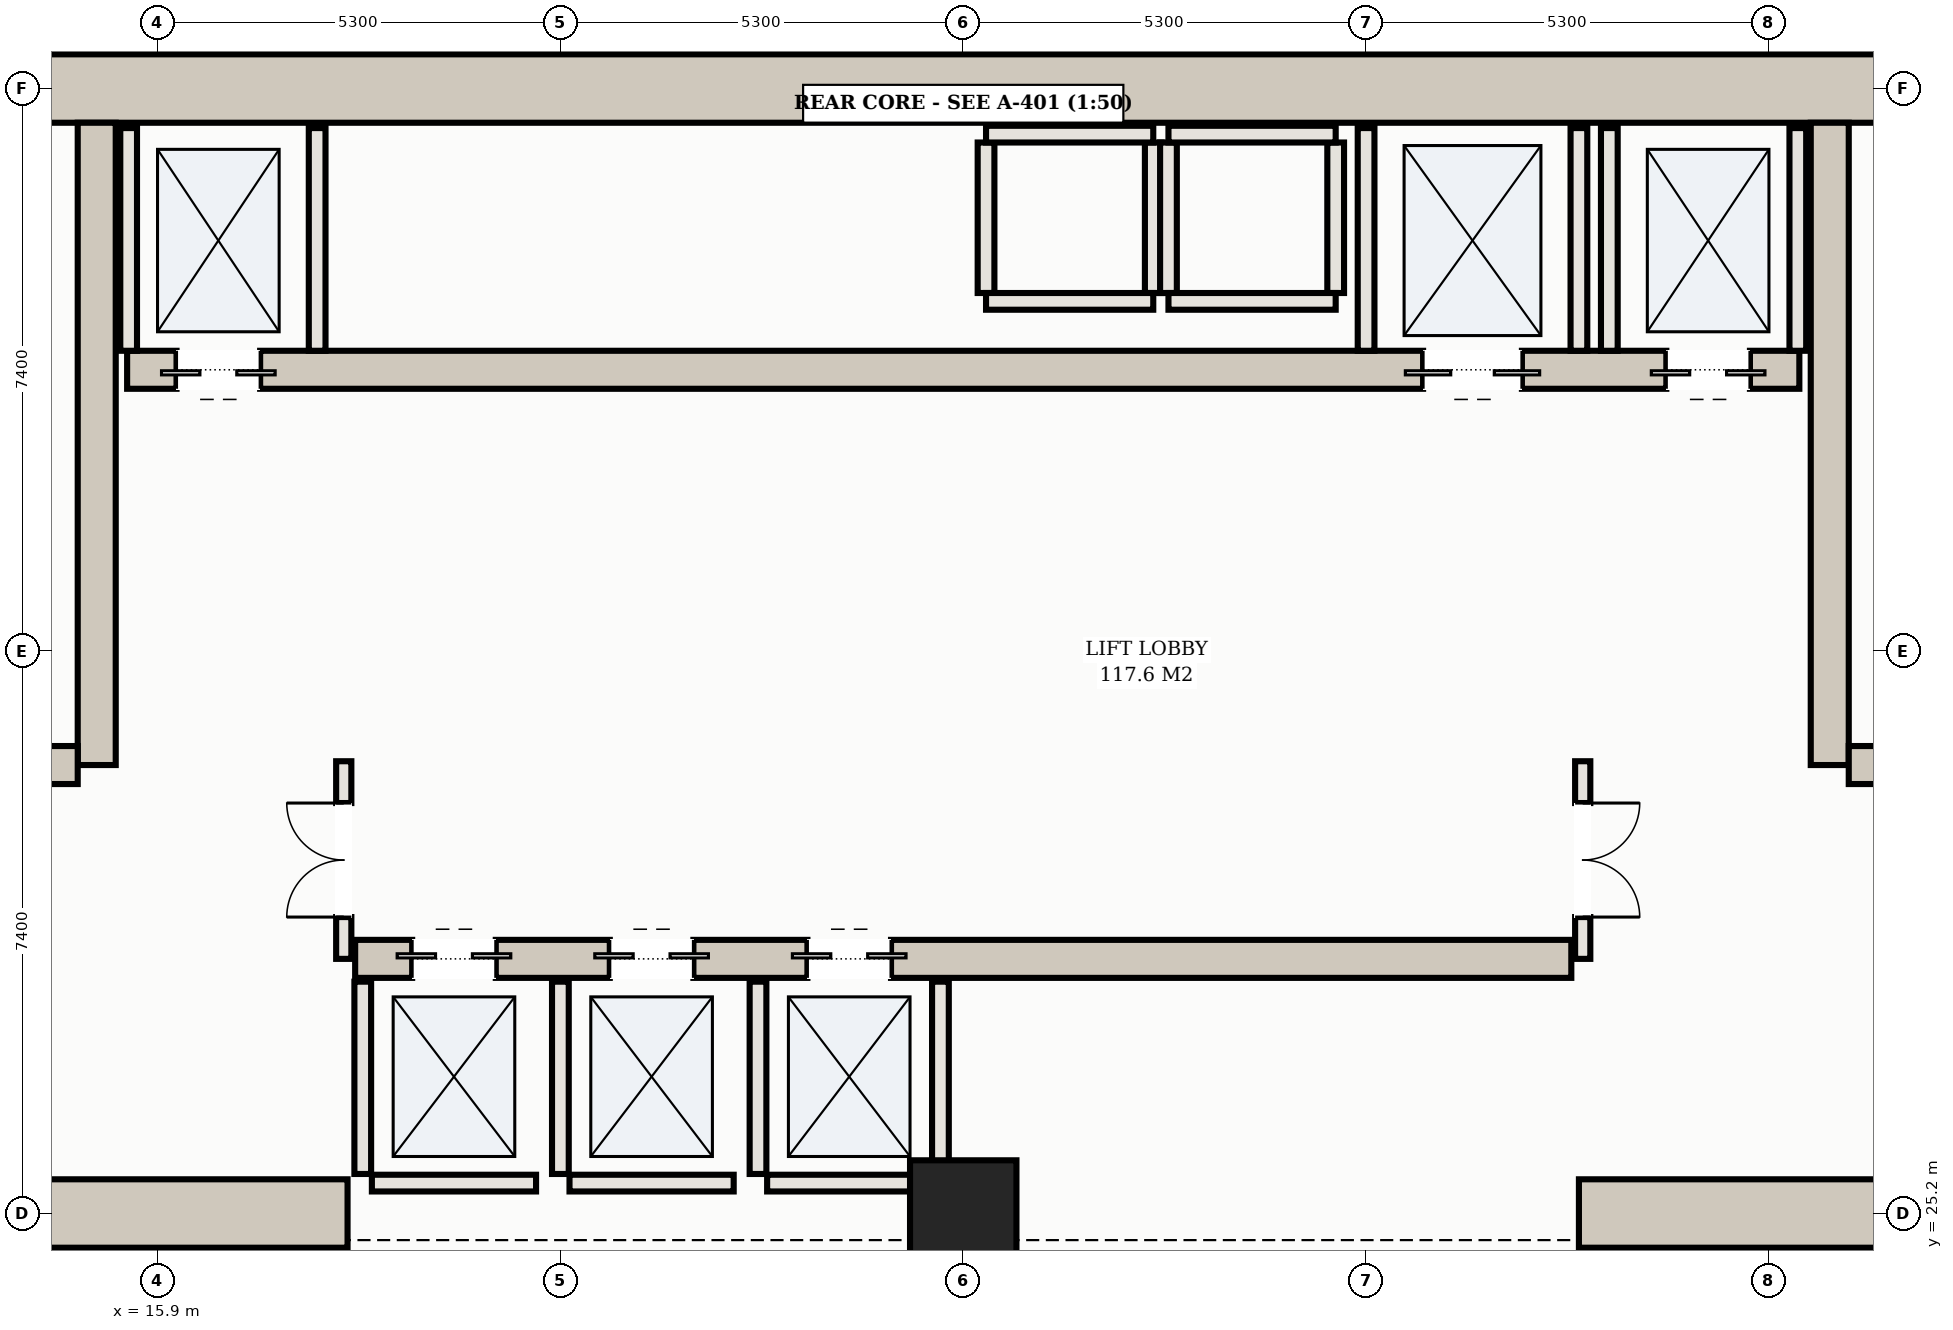
"""IFC4 building model, lengths in metres.
Left out: names, types, materials, properties, quantities, classifications, styles, units other than length and angle.
Written with IfcOpenShell. Run it as: python <this file> out.ifc"""

import sys

from ifc_helpers import new_model, si_unit, direction, frame, frame_2d, origin, origin_2d, place, context, subcontext, project, spatial, rectangle, hollow_rectangle, extrude, element, fill, save


model = new_model("IFC4")
c1 = context("Model", 3, precision=1e-05, world=origin(), true_north=direction((0.0, 1.0)))
c2 = subcontext(c1, "Body", "Model", "MODEL_VIEW")
j1 = project(units=[si_unit("LENGTHUNIT", "METRE"), si_unit("PLANEANGLEUNIT", "RADIAN")], contexts=[c1])
p1 = place(None, origin())
s1 = spatial("IfcSite", under=j1, at=p1, CompositionType="ELEMENT")
p2 = place(p1, origin())
s2 = spatial("IfcBuilding", under=s1, at=p2, CompositionType="ELEMENT")
p3 = place(p2, frame((0.0, 0.0, -8.4)))
s3 = spatial("IfcBuildingStorey", under=s2, at=p3, CompositionType="ELEMENT", Elevation=-8.4)
p4 = place(p3, frame((10.15, 40.0, 0.0), z_axis=(0.0, 0.0, 1.0), x_axis=(1.0, 0.0, 0.0)))
e1 = element("IfcWall", 1, at=p4, inside=s3, PredefinedType="SHEAR", context=c2, shape_type="SweptSolid", body=[
    extrude(rectangle(XDim=32.7, YDim=0.9, at=frame_2d((16.35, 0.0))), origin(), (0.0, 0.0, 1.0), 3.92),
])
for number, where, z_axis, x_axis in (
    (2, (10.15, 25.2, 0.0), (0.0, 0.0, 1.0), (1.0, 0.0, 0.0)),
    (3, (34.6, 25.2, 0.0), (0.0, 0.0, 1.0), (1.0, 0.0, 0.0)),
):
    element("IfcWall", number, at=place(p3, frame(where, z_axis=z_axis, x_axis=x_axis)), inside=s3, PredefinedType="SHEAR", context=c2, shape_type="SweptSolid", body=[
        extrude(rectangle(XDim=8.25, YDim=0.9, at=frame_2d((4.125, 0.0))), origin(), (0.0, 0.0, 1.0), 3.92),
    ])
p5 = place(p3, frame((15.1, 31.1, 0.0), z_axis=(0.0, 0.0, 1.0), x_axis=(0.0, 1.0, 0.0)))
e4 = element("IfcWall", 4, at=p5, inside=s3, PredefinedType="SHEAR", context=c2, shape_type="SweptSolid", body=[
    extrude(rectangle(XDim=8.45, YDim=0.5, at=frame_2d((4.225, 0.0))), origin(), (0.0, 0.0, 1.0), 3.92),
])
p6 = place(p3, frame((11.05, 31.1, 0.0), z_axis=(0.0, 0.0, 1.0), x_axis=(1.0, 0.0, 0.0)))
e5 = element("IfcWall", 5, at=p6, inside=s3, PredefinedType="SHEAR", context=c2, shape_type="SweptSolid", body=[
    extrude(rectangle(XDim=3.8, YDim=0.5, at=frame_2d((1.9, 0.0))), origin(), (0.0, 0.0, 1.0), 3.92),
])
p7 = place(p3, frame((37.9, 31.1, 0.0), z_axis=(0.0, 0.0, 1.0), x_axis=(0.0, 1.0, 0.0)))
e6 = element("IfcWall", 6, at=p7, inside=s3, PredefinedType="SHEAR", context=c2, shape_type="SweptSolid", body=[
    extrude(rectangle(XDim=8.45, YDim=0.5, at=frame_2d((4.225, 0.0))), origin(), (0.0, 0.0, 1.0), 3.92),
])
p8 = place(p3, frame((38.15, 31.1, 0.0), z_axis=(0.0, 0.0, 1.0), x_axis=(1.0, 0.0, 0.0)))
e7 = element("IfcWall", 7, at=p8, inside=s3, PredefinedType="SHEAR", context=c2, shape_type="SweptSolid", body=[
    extrude(rectangle(XDim=3.8, YDim=0.5, at=frame_2d((1.9, 0.0))), origin(), (0.0, 0.0, 1.0), 3.92),
])
p9 = place(p3, frame((15.5, 36.3, 0.0), z_axis=(0.0, 0.0, 1.0), x_axis=(1.0, 0.0, 0.0)))
e8 = element("IfcWall", 8, at=p9, inside=s3, PredefinedType="SHEAR", context=c2, shape_type="SweptSolid", body=[
    extrude(rectangle(XDim=22.0, YDim=0.5, at=frame_2d((11.0, 0.0))), origin(), (0.0, 0.0, 1.0), 3.92),
])
p10 = place(p9, frame((0.65, 0.0, 0.0)))
e9 = element("IfcOpeningElement", 9, at=p10, cuts=e8, PredefinedType="OPENING", context=c2, shape_type="SweptSolid", body=[
    extrude(rectangle(XDim=1.1, YDim=2.15, at=frame_2d((0.55, 1.075))), frame((0.0, 0.26, 0.0), z_axis=(0.0, -1.0, 0.0), x_axis=(1.0, 0.0, 0.0)), (0.0, 0.0, 1.0), 0.52),
])
p11 = place(p9, frame((20.25, 0.0, 0.0)))
e10 = element("IfcOpeningElement", 10, at=p11, cuts=e8, PredefinedType="OPENING", context=c2, shape_type="SweptSolid", body=[
    extrude(rectangle(XDim=1.1, YDim=2.15, at=frame_2d((0.55, 1.075))), frame((0.0, 0.26, 0.0), z_axis=(0.0, -1.0, 0.0), x_axis=(1.0, 0.0, 0.0)), (0.0, 0.0, 1.0), 0.52),
])
p12 = place(p9, frame((17.05, 0.0, 0.0)))
e11 = element("IfcOpeningElement", 11, at=p12, cuts=e8, PredefinedType="OPENING", context=c2, shape_type="SweptSolid", body=[
    extrude(rectangle(XDim=1.3, YDim=2.2, at=frame_2d((0.65, 1.1))), frame((0.0, 0.26, 0.0), z_axis=(0.0, -1.0, 0.0), x_axis=(1.0, 0.0, 0.0)), (0.0, 0.0, 1.0), 0.52),
])
p13 = place(p3, frame((18.5, 28.55, 0.0), z_axis=(0.0, 0.0, 1.0), x_axis=(1.0, 0.0, 0.0)))
e12 = element("IfcWall", 12, at=p13, inside=s3, PredefinedType="SHEAR", context=c2, shape_type="SweptSolid", body=[
    extrude(rectangle(XDim=16.0, YDim=0.5, at=frame_2d((8.0, 0.0))), origin(), (0.0, 0.0, 1.0), 3.92),
])
p14 = place(p13, frame((0.75, 0.0, 0.0)))
e13 = element("IfcOpeningElement", 13, at=p14, cuts=e12, PredefinedType="OPENING", context=c2, shape_type="SweptSolid", body=[
    extrude(rectangle(XDim=1.1, YDim=2.15, at=frame_2d((0.55, 1.075))), frame((0.0, 0.26, 0.0), z_axis=(0.0, -1.0, 0.0), x_axis=(1.0, 0.0, 0.0)), (0.0, 0.0, 1.0), 0.52),
])
p15 = place(p13, frame((3.35, 0.0, 0.0)))
e14 = element("IfcOpeningElement", 14, at=p15, cuts=e12, PredefinedType="OPENING", context=c2, shape_type="SweptSolid", body=[
    extrude(rectangle(XDim=1.1, YDim=2.15, at=frame_2d((0.55, 1.075))), frame((0.0, 0.26, 0.0), z_axis=(0.0, -1.0, 0.0), x_axis=(1.0, 0.0, 0.0)), (0.0, 0.0, 1.0), 0.52),
])
p16 = place(p13, frame((5.95, 0.0, 0.0)))
e15 = element("IfcOpeningElement", 15, at=p16, cuts=e12, PredefinedType="OPENING", context=c2, shape_type="SweptSolid", body=[
    extrude(rectangle(XDim=1.1, YDim=2.15, at=frame_2d((0.55, 1.075))), frame((0.0, 0.26, 0.0), z_axis=(0.0, -1.0, 0.0), x_axis=(1.0, 0.0, 0.0)), (0.0, 0.0, 1.0), 0.52),
])
p17 = place(p3, frame((26.5, 25.2, 0.0), z_axis=(0.0, 0.0, 1.0), x_axis=(1.0, 0.0, 0.0)))
e16 = element("IfcColumn", 16, at=p17, inside=s3, PredefinedType="COLUMN", context=c2, shape_type="SweptSolid", body=[
    extrude(hollow_rectangle(XDim=1.4, YDim=1.4, WallThickness=0.045, at=origin_2d()), origin(), (0.0, 0.0, 1.0), 4.2),
])
for number, where, z_axis, x_axis in (
    (17, (15.52, 36.55, 0.0), (0.0, 0.0, 1.0), (0.0, 1.0, 0.0)),
    (18, (18.0, 36.55, 0.0), (0.0, 0.0, 1.0), (0.0, 1.0, 0.0)),
    (19, (35.0, 36.55, 0.0), (0.0, 0.0, 1.0), (0.0, 1.0, 0.0)),
    (20, (37.48, 36.55, 0.0), (0.0, 0.0, 1.0), (0.0, 1.0, 0.0)),
    (21, (31.8, 36.55, 0.0), (0.0, 0.0, 1.0), (0.0, 1.0, 0.0)),
    (22, (34.6, 36.55, 0.0), (0.0, 0.0, 1.0), (0.0, 1.0, 0.0)),
):
    element("IfcWall", number, at=place(p3, frame(where, z_axis=z_axis, x_axis=x_axis)), inside=s3, PredefinedType="SOLIDWALL", context=c2, shape_type="SweptSolid", body=[
        extrude(rectangle(XDim=2.93, YDim=0.22, at=frame_2d((1.465, 0.0))), origin(), (0.0, 0.0, 1.0), 3.92),
    ])
p18 = place(p3, frame((18.6, 25.72, 0.0), z_axis=(0.0, 0.0, 1.0), x_axis=(0.0, 1.0, 0.0)))
e23 = element("IfcWall", 23, at=p18, inside=s3, PredefinedType="SOLIDWALL", context=c2, shape_type="SweptSolid", body=[
    extrude(rectangle(XDim=2.53, YDim=0.22, at=frame_2d((1.265, 0.0))), origin(), (0.0, 0.0, 1.0), 3.92),
])
p19 = place(p3, frame((18.72, 25.6, 0.0), z_axis=(0.0, 0.0, 1.0), x_axis=(1.0, 0.0, 0.0)))
e24 = element("IfcWall", 24, at=p19, inside=s3, PredefinedType="SOLIDWALL", context=c2, shape_type="SweptSolid", body=[
    extrude(rectangle(XDim=2.16, YDim=0.22, at=frame_2d((1.08, 0.0))), origin(), (0.0, 0.0, 1.0), 2.965),
])
p20 = place(p3, frame((21.2, 25.72, 0.0), z_axis=(0.0, 0.0, 1.0), x_axis=(0.0, 1.0, 0.0)))
e25 = element("IfcWall", 25, at=p20, inside=s3, PredefinedType="SOLIDWALL", context=c2, shape_type="SweptSolid", body=[
    extrude(rectangle(XDim=2.53, YDim=0.22, at=frame_2d((1.265, 0.0))), origin(), (0.0, 0.0, 1.0), 3.92),
])
p21 = place(p3, frame((21.32, 25.6, 0.0), z_axis=(0.0, 0.0, 1.0), x_axis=(1.0, 0.0, 0.0)))
e26 = element("IfcWall", 26, at=p21, inside=s3, PredefinedType="SOLIDWALL", context=c2, shape_type="SweptSolid", body=[
    extrude(rectangle(XDim=2.16, YDim=0.22, at=frame_2d((1.08, 0.0))), origin(), (0.0, 0.0, 1.0), 2.965),
])
for number, where, z_axis, x_axis in (
    (27, (23.8, 25.72, 0.0), (0.0, 0.0, 1.0), (0.0, 1.0, 0.0)),
    (28, (26.2, 25.72, 0.0), (0.0, 0.0, 1.0), (0.0, 1.0, 0.0)),
):
    element("IfcWall", number, at=place(p3, frame(where, z_axis=z_axis, x_axis=x_axis)), inside=s3, PredefinedType="SOLIDWALL", context=c2, shape_type="SweptSolid", body=[
        extrude(rectangle(XDim=2.53, YDim=0.22, at=frame_2d((1.265, 0.0))), origin(), (0.0, 0.0, 1.0), 3.92),
    ])
p22 = place(p3, frame((23.92, 25.6, 0.0), z_axis=(0.0, 0.0, 1.0), x_axis=(1.0, 0.0, 0.0)))
e29 = element("IfcWall", 29, at=p22, inside=s3, PredefinedType="SOLIDWALL", context=c2, shape_type="SweptSolid", body=[
    extrude(rectangle(XDim=2.16, YDim=0.22, at=frame_2d((1.08, 0.0))), origin(), (0.0, 0.0, 1.0), 2.965),
])
for number, where, z_axis, x_axis in (
    (30, (26.8, 37.31, 0.0), (0.0, 0.0, 1.0), (0.0, 1.0, 0.0)),
    (31, (29.0, 37.31, 0.0), (0.0, 0.0, 1.0), (0.0, 1.0, 0.0)),
):
    element("IfcWall", number, at=place(p3, frame(where, z_axis=z_axis, x_axis=x_axis)), inside=s3, PredefinedType="SOLIDWALL", context=c2, shape_type="SweptSolid", body=[
        extrude(rectangle(XDim=1.98, YDim=0.22, at=frame_2d((0.99, 0.0))), origin(), (0.0, 0.0, 1.0), 3.92),
    ])
for number, where, z_axis, x_axis in (
    (32, (26.8, 39.4, 0.0), (0.0, 0.0, 1.0), (1.0, 0.0, 0.0)),
    (33, (26.8, 37.2, 0.0), (0.0, 0.0, 1.0), (1.0, 0.0, 0.0)),
):
    element("IfcWall", number, at=place(p3, frame(where, z_axis=z_axis, x_axis=x_axis)), inside=s3, PredefinedType="SOLIDWALL", context=c2, shape_type="SweptSolid", body=[
        extrude(rectangle(XDim=2.2, YDim=0.22, at=frame_2d((1.1, 0.0))), origin(), (0.0, 0.0, 1.0), 3.92),
    ])
for number, where, z_axis, x_axis in (
    (34, (29.2, 37.31, 0.0), (0.0, 0.0, 1.0), (0.0, 1.0, 0.0)),
    (35, (31.4, 37.31, 0.0), (0.0, 0.0, 1.0), (0.0, 1.0, 0.0)),
):
    element("IfcWall", number, at=place(p3, frame(where, z_axis=z_axis, x_axis=x_axis)), inside=s3, PredefinedType="SOLIDWALL", context=c2, shape_type="SweptSolid", body=[
        extrude(rectangle(XDim=1.98, YDim=0.22, at=frame_2d((0.99, 0.0))), origin(), (0.0, 0.0, 1.0), 3.92),
    ])
for number, where, z_axis, x_axis in (
    (36, (29.2, 39.4, 0.0), (0.0, 0.0, 1.0), (1.0, 0.0, 0.0)),
    (37, (29.2, 37.2, 0.0), (0.0, 0.0, 1.0), (1.0, 0.0, 0.0)),
):
    element("IfcWall", number, at=place(p3, frame(where, z_axis=z_axis, x_axis=x_axis)), inside=s3, PredefinedType="SOLIDWALL", context=c2, shape_type="SweptSolid", body=[
        extrude(rectangle(XDim=2.2, YDim=0.22, at=frame_2d((1.1, 0.0))), origin(), (0.0, 0.0, 1.0), 3.92),
    ])
p23 = place(p3, frame((18.35, 28.55, 0.0), z_axis=(0.0, 0.0, 1.0), x_axis=(0.0, 1.0, 0.0)))
e38 = element("IfcWall", 38, at=p23, inside=s3, PredefinedType="PARTITIONING", context=c2, shape_type="SweptSolid", body=[
    extrude(rectangle(XDim=2.6, YDim=0.2, at=frame_2d((1.3, 0.0))), origin(), (0.0, 0.0, 1.0), 3.92),
])
p24 = place(p23, frame((0.55, 0.0, 0.0)))
e39 = element("IfcOpeningElement", 39, at=p24, cuts=e38, PredefinedType="OPENING", context=c2, shape_type="SweptSolid", body=[
    extrude(rectangle(XDim=1.5, YDim=2.25, at=frame_2d((0.75, 1.125))), frame((0.0, 0.11, 0.0), z_axis=(0.0, -1.0, 0.0), x_axis=(1.0, 0.0, 0.0)), (0.0, 0.0, 1.0), 0.22),
])
p25 = place(p3, frame((34.65, 28.55, 0.0), z_axis=(0.0, 0.0, 1.0), x_axis=(0.0, 1.0, 0.0)))
e40 = element("IfcWall", 40, at=p25, inside=s3, PredefinedType="PARTITIONING", context=c2, shape_type="SweptSolid", body=[
    extrude(rectangle(XDim=2.6, YDim=0.2, at=frame_2d((1.3, 0.0))), origin(), (0.0, 0.0, 1.0), 3.92),
])
p26 = place(p25, frame((0.55, 0.0, 0.0)))
e41 = element("IfcOpeningElement", 41, at=p26, cuts=e40, PredefinedType="OPENING", context=c2, shape_type="SweptSolid", body=[
    extrude(rectangle(XDim=1.5, YDim=2.25, at=frame_2d((0.75, 1.125))), frame((0.0, 0.11, 0.0), z_axis=(0.0, -1.0, 0.0), x_axis=(1.0, 0.0, 0.0)), (0.0, 0.0, 1.0), 0.22),
])
p27 = place(p10, frame((1.1, 0.0, 0.0), z_axis=(0.0, 0.0, 1.0), x_axis=(-1.0, 0.0, 0.0)))
e42 = element("IfcDoor", 42, at=p27, inside=s3, OperationType="DOUBLE_DOOR_SLIDING", PredefinedType="DOOR", context=c2, shape_type="SweptSolid", body=[
    extrude(rectangle(XDim=1.1, YDim=2.15, at=frame_2d((0.55, 1.075))), frame((0.0, 0.025, 0.0), z_axis=(0.0, -1.0, 0.0), x_axis=(1.0, 0.0, 0.0)), (0.0, 0.0, 1.0), 0.05),
])
fill(e9, e42)
p28 = place(p11, frame((1.1, 0.0, 0.0), z_axis=(0.0, 0.0, 1.0), x_axis=(-1.0, 0.0, 0.0)))
e43 = element("IfcDoor", 43, at=p28, inside=s3, OperationType="DOUBLE_DOOR_SLIDING", PredefinedType="DOOR", context=c2, shape_type="SweptSolid", body=[
    extrude(rectangle(XDim=1.1, YDim=2.15, at=frame_2d((0.55, 1.075))), frame((0.0, 0.025, 0.0), z_axis=(0.0, -1.0, 0.0), x_axis=(1.0, 0.0, 0.0)), (0.0, 0.0, 1.0), 0.05),
])
fill(e10, e43)
p29 = place(p12, frame((1.3, 0.0, 0.0), z_axis=(0.0, 0.0, 1.0), x_axis=(-1.0, 0.0, 0.0)))
e44 = element("IfcDoor", 44, at=p29, inside=s3, OperationType="DOUBLE_DOOR_SLIDING", PredefinedType="DOOR", context=c2, shape_type="SweptSolid", body=[
    extrude(rectangle(XDim=1.3, YDim=2.2, at=frame_2d((0.65, 1.1))), frame((0.0, 0.025, 0.0), z_axis=(0.0, -1.0, 0.0), x_axis=(1.0, 0.0, 0.0)), (0.0, 0.0, 1.0), 0.05),
])
fill(e11, e44)
p30 = place(p14, origin())
e45 = element("IfcDoor", 45, at=p30, inside=s3, OperationType="DOUBLE_DOOR_SLIDING", PredefinedType="DOOR", context=c2, shape_type="SweptSolid", body=[
    extrude(rectangle(XDim=1.1, YDim=2.15, at=frame_2d((0.55, 1.075))), frame((0.0, 0.025, 0.0), z_axis=(0.0, -1.0, 0.0), x_axis=(1.0, 0.0, 0.0)), (0.0, 0.0, 1.0), 0.05),
])
fill(e13, e45)
p31 = place(p15, origin())
e46 = element("IfcDoor", 46, at=p31, inside=s3, OperationType="DOUBLE_DOOR_SLIDING", PredefinedType="DOOR", context=c2, shape_type="SweptSolid", body=[
    extrude(rectangle(XDim=1.1, YDim=2.15, at=frame_2d((0.55, 1.075))), frame((0.0, 0.025, 0.0), z_axis=(0.0, -1.0, 0.0), x_axis=(1.0, 0.0, 0.0)), (0.0, 0.0, 1.0), 0.05),
])
fill(e14, e46)
p32 = place(p16, origin())
e47 = element("IfcDoor", 47, at=p32, inside=s3, OperationType="DOUBLE_DOOR_SLIDING", PredefinedType="DOOR", context=c2, shape_type="SweptSolid", body=[
    extrude(rectangle(XDim=1.1, YDim=2.15, at=frame_2d((0.55, 1.075))), frame((0.0, 0.025, 0.0), z_axis=(0.0, -1.0, 0.0), x_axis=(1.0, 0.0, 0.0)), (0.0, 0.0, 1.0), 0.05),
])
fill(e15, e47)
p33 = place(p24, origin())
e48 = element("IfcDoor", 48, at=p33, inside=s3, OperationType="DOUBLE_DOOR_SINGLE_SWING", PredefinedType="DOOR", context=c2, shape_type="SweptSolid", body=[
    extrude(rectangle(XDim=1.5, YDim=2.25, at=frame_2d((0.75, 1.125))), frame((0.0, 0.025, 0.0), z_axis=(0.0, -1.0, 0.0), x_axis=(1.0, 0.0, 0.0)), (0.0, 0.0, 1.0), 0.05),
])
fill(e39, e48)
p34 = place(p26, frame((1.5, 0.0, 0.0), z_axis=(0.0, 0.0, 1.0), x_axis=(-1.0, 0.0, 0.0)))
e49 = element("IfcDoor", 49, at=p34, inside=s3, OperationType="DOUBLE_DOOR_SINGLE_SWING", PredefinedType="DOOR", context=c2, shape_type="SweptSolid", body=[
    extrude(rectangle(XDim=1.5, YDim=2.25, at=frame_2d((0.75, 1.125))), frame((0.0, 0.025, 0.0), z_axis=(0.0, -1.0, 0.0), x_axis=(1.0, 0.0, 0.0)), (0.0, 0.0, 1.0), 0.05),
])
fill(e41, e49)
save(model, sys.argv[1])
